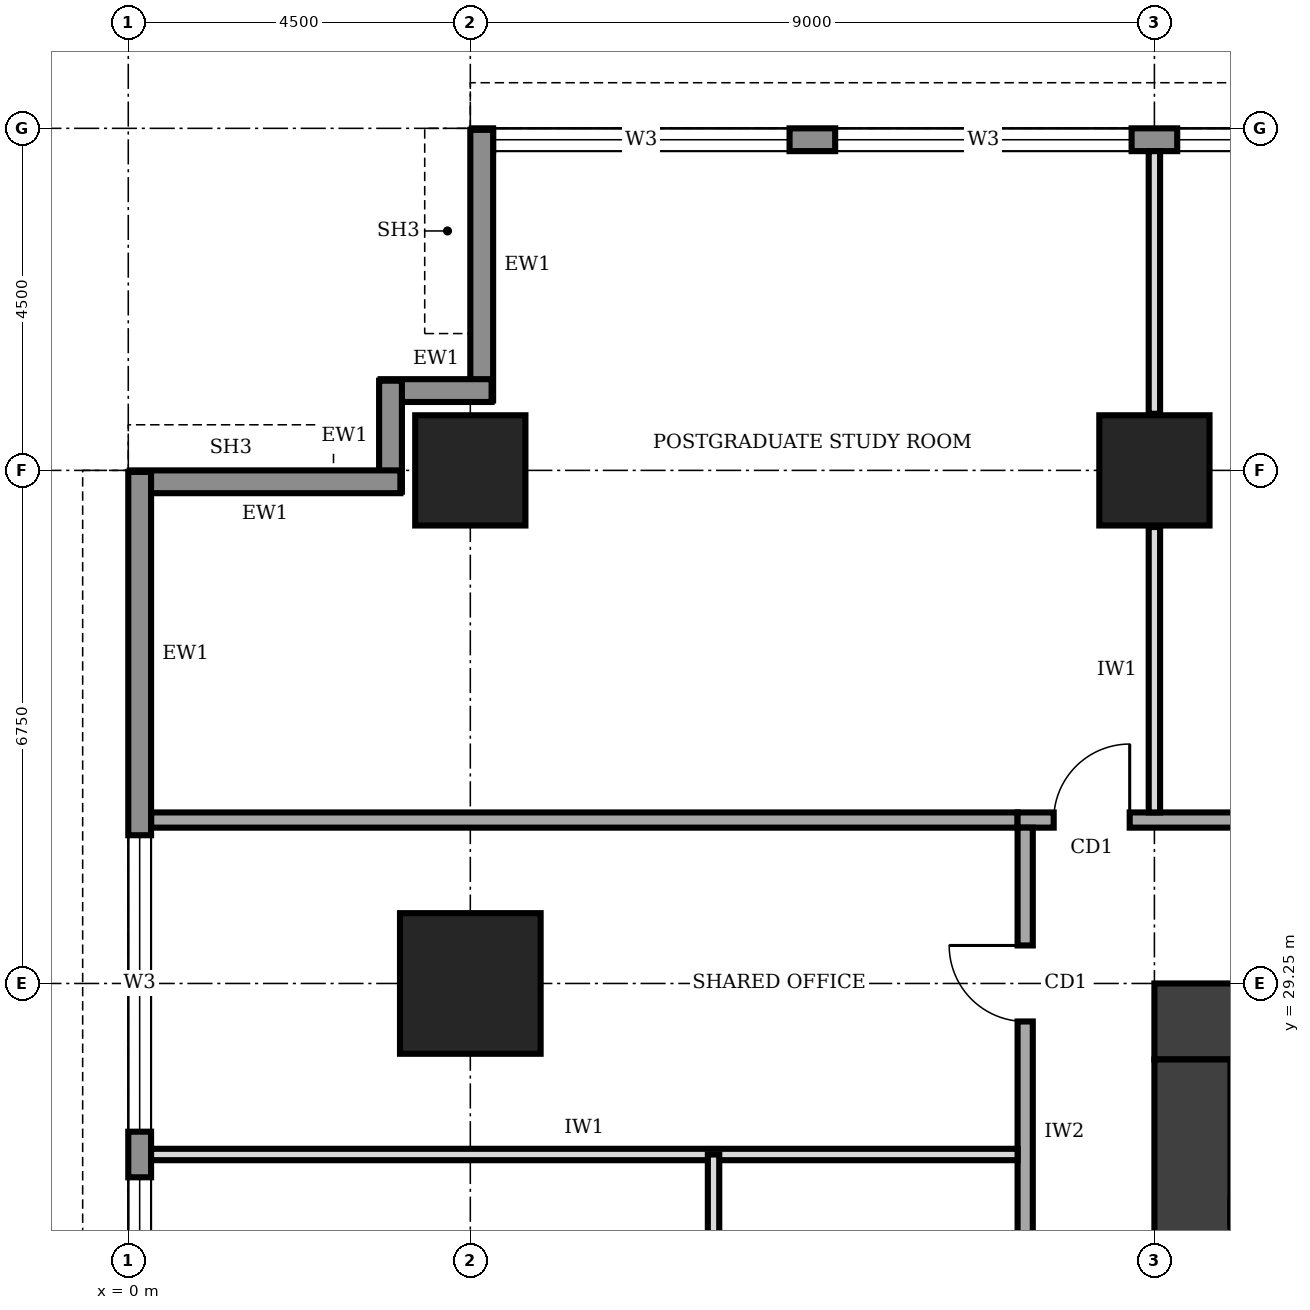
"""IFC4 building model, lengths in metres.
Left out: names, types, materials, properties, quantities, classifications, styles, units other than length and angle.
Written with IfcOpenShell. Run it as: python <this file> out.ifc"""

import sys

from ifc_helpers import new_model, si_unit, direction, frame, frame_2d, origin, origin_2d, place, context, subcontext, project, spatial, rectangle, extrude, element, fill, save


model = new_model("IFC4")
c1 = context("Model", 3, precision=1e-05, world=origin(), true_north=direction((0.0, 1.0)))
c2 = subcontext(c1, "Body", "Model", "MODEL_VIEW")
j1 = project(units=[si_unit("LENGTHUNIT", "METRE"), si_unit("PLANEANGLEUNIT", "RADIAN")], contexts=[c1])
p1 = place(None, origin())
s1 = spatial("IfcSite", under=j1, at=p1, CompositionType="ELEMENT")
p2 = place(p1, origin())
s2 = spatial("IfcBuilding", under=s1, at=p2, CompositionType="ELEMENT")
p3 = place(p2, frame((0.0, 0.0, 261.0)))
s3 = spatial("IfcBuildingStorey", under=s2, at=p3, CompositionType="ELEMENT", Elevation=261.0)
p4 = place(p3, frame((27.0, 28.75, 0.0), z_axis=(0.0, 0.0, 1.0), x_axis=(-1.0, 0.0, 0.0)))
e1 = element("IfcWall", 1, at=p4, inside=s3, PredefinedType="SHEAR", context=c2, shape_type="SweptSolid", body=[
    extrude(rectangle(XDim=13.5, YDim=1.0, at=frame_2d((6.75, 0.0))), origin(), (0.0, 0.0, 1.0), 4.0),
])
p5 = place(p4, frame((4.75, 0.0, 0.0)))
e2 = element("IfcOpeningElement", 2, at=p5, cuts=e1, PredefinedType="OPENING", context=c2, shape_type="SweptSolid", body=[
    extrude(rectangle(XDim=1.8, YDim=2.1, at=frame_2d((0.9, 1.05))), frame((0.0, 0.51, 0.0), z_axis=(0.0, -1.0, 0.0), x_axis=(1.0, 0.0, 0.0)), (0.0, 0.0, 1.0), 1.02),
])
p6 = place(p3, frame((14.0, 28.25, 0.0), z_axis=(0.0, 0.0, 1.0), x_axis=(0.0, -1.0, 0.0)))
e3 = element("IfcWall", 3, at=p6, inside=s3, PredefinedType="SHEAR", context=c2, shape_type="SweptSolid", body=[
    extrude(rectangle(XDim=16.0, YDim=1.0, at=frame_2d((8.0, 0.0))), origin(), (0.0, 0.0, 1.0), 4.0),
])
p7 = place(p3, frame((4.5, 29.25, 0.0), z_axis=(0.0, 0.0, 1.0), x_axis=(1.0, 0.0, 0.0)))
e4 = element("IfcColumn", 4, at=p7, inside=s3, PredefinedType="COLUMN", context=c2, shape_type="SweptSolid", body=[
    extrude(rectangle(XDim=1.85, YDim=1.85, at=origin_2d()), origin(), (0.0, 0.0, 1.0), 4.0),
])
for number, where, z_axis, x_axis in (
    (5, (4.5, 36.0, 0.0), (0.0, 0.0, 1.0), (1.0, 0.0, 0.0)),
    (6, (13.5, 36.0, 0.0), (0.0, 0.0, 1.0), (1.0, 0.0, 0.0)),
):
    element("IfcColumn", number, at=place(p3, frame(where, z_axis=z_axis, x_axis=x_axis)), inside=s3, PredefinedType="COLUMN", context=c2, shape_type="SweptSolid", body=[
        extrude(rectangle(XDim=1.45, YDim=1.45, at=origin_2d()), origin(), (0.0, 0.0, 1.0), 4.0),
    ])
p8 = place(p3, frame((35.98, 40.35, 0.0), z_axis=(0.0, 0.0, 1.0), x_axis=(-1.0, 0.0, 0.0)))
e7 = element("IfcWall", 7, at=p8, inside=s3, PredefinedType="STANDARD", context=c2, shape_type="SweptSolid", body=[
    extrude(rectangle(XDim=31.46, YDim=0.3, at=frame_2d((15.73, 0.0))), origin(), (0.0, 0.0, 1.0), 3.75),
])
p9 = place(p8, frame((27.28, 0.0, 0.95)))
e8 = element("IfcOpeningElement", 8, at=p9, cuts=e7, PredefinedType="OPENING", context=c2, shape_type="SweptSolid", body=[
    extrude(rectangle(XDim=3.9, YDim=1.8, at=frame_2d((1.95, 0.9))), frame((0.0, 0.16, 0.0), z_axis=(0.0, -1.0, 0.0), x_axis=(1.0, 0.0, 0.0)), (0.0, 0.0, 1.0), 0.32),
])
p10 = place(p8, frame((22.78, 0.0, 0.95)))
e9 = element("IfcOpeningElement", 9, at=p10, cuts=e7, PredefinedType="OPENING", context=c2, shape_type="SweptSolid", body=[
    extrude(rectangle(XDim=3.9, YDim=1.8, at=frame_2d((1.95, 0.9))), frame((0.0, 0.16, 0.0), z_axis=(0.0, -1.0, 0.0), x_axis=(1.0, 0.0, 0.0)), (0.0, 0.0, 1.0), 0.32),
])
p11 = place(p8, frame((18.28, 0.0, 0.95)))
e10 = element("IfcOpeningElement", 10, at=p11, cuts=e7, PredefinedType="OPENING", context=c2, shape_type="SweptSolid", body=[
    extrude(rectangle(XDim=3.9, YDim=1.8, at=frame_2d((1.95, 0.9))), frame((0.0, 0.16, 0.0), z_axis=(0.0, -1.0, 0.0), x_axis=(1.0, 0.0, 0.0)), (0.0, 0.0, 1.0), 0.32),
])
p12 = place(p8, frame((13.78, 0.0, 0.95)))
e11 = element("IfcOpeningElement", 11, at=p12, cuts=e7, PredefinedType="OPENING", context=c2, shape_type="SweptSolid", body=[
    extrude(rectangle(XDim=3.9, YDim=1.8, at=frame_2d((1.95, 0.9))), frame((0.0, 0.16, 0.0), z_axis=(0.0, -1.0, 0.0), x_axis=(1.0, 0.0, 0.0)), (0.0, 0.0, 1.0), 0.32),
])
p13 = place(p8, frame((9.28, 0.0, 0.95)))
e12 = element("IfcOpeningElement", 12, at=p13, cuts=e7, PredefinedType="OPENING", context=c2, shape_type="SweptSolid", body=[
    extrude(rectangle(XDim=3.9, YDim=1.8, at=frame_2d((1.95, 0.9))), frame((0.0, 0.16, 0.0), z_axis=(0.0, -1.0, 0.0), x_axis=(1.0, 0.0, 0.0)), (0.0, 0.0, 1.0), 0.32),
])
p14 = place(p8, frame((4.78, 0.0, 0.95)))
e13 = element("IfcOpeningElement", 13, at=p14, cuts=e7, PredefinedType="OPENING", context=c2, shape_type="SweptSolid", body=[
    extrude(rectangle(XDim=3.9, YDim=1.8, at=frame_2d((1.95, 0.9))), frame((0.0, 0.16, 0.0), z_axis=(0.0, -1.0, 0.0), x_axis=(1.0, 0.0, 0.0)), (0.0, 0.0, 1.0), 0.32),
])
p15 = place(p3, frame((4.65, 40.48, 0.0), z_axis=(0.0, 0.0, 1.0), x_axis=(0.0, -1.0, 0.0)))
e14 = element("IfcWall", 14, at=p15, inside=s3, PredefinedType="STANDARD", context=c2, shape_type="SweptSolid", body=[
    extrude(rectangle(XDim=3.56, YDim=0.3, at=frame_2d((1.78, 0.0))), origin(), (0.0, 0.0, 1.0), 2.85),
])
for number, where, z_axis, x_axis in (
    (15, (4.78, 37.05, 0.0), (0.0, 0.0, 1.0), (-1.0, 0.0, 0.0)),
    (16, (3.45, 37.18, 0.0), (0.0, 0.0, 1.0), (0.0, -1.0, 0.0)),
):
    element("IfcWall", number, at=place(p3, frame(where, z_axis=z_axis, x_axis=x_axis)), inside=s3, PredefinedType="STANDARD", context=c2, shape_type="SweptSolid", body=[
        extrude(rectangle(XDim=1.46, YDim=0.3, at=frame_2d((0.73, 0.0))), origin(), (0.0, 0.0, 1.0), 3.75),
    ])
p16 = place(p3, frame((3.58, 35.85, 0.0), z_axis=(0.0, 0.0, 1.0), x_axis=(-1.0, 0.0, 0.0)))
e17 = element("IfcWall", 17, at=p16, inside=s3, PredefinedType="STANDARD", context=c2, shape_type="SweptSolid", body=[
    extrude(rectangle(XDim=3.56, YDim=0.3, at=frame_2d((1.78, 0.0))), origin(), (0.0, 0.0, 1.0), 2.85),
])
p17 = place(p3, frame((0.15, 35.98, 0.0), z_axis=(0.0, 0.0, 1.0), x_axis=(0.0, -1.0, 0.0)))
e18 = element("IfcWall", 18, at=p17, inside=s3, PredefinedType="STANDARD", context=c2, shape_type="SweptSolid", body=[
    extrude(rectangle(XDim=31.46, YDim=0.3, at=frame_2d((15.73, 0.0))), origin(), (0.0, 0.0, 1.0), 3.75),
])
p18 = place(p17, frame((27.28, 0.0, 0.95)))
e19 = element("IfcOpeningElement", 19, at=p18, cuts=e18, PredefinedType="OPENING", context=c2, shape_type="SweptSolid", body=[
    extrude(rectangle(XDim=3.9, YDim=1.8, at=frame_2d((1.95, 0.9))), frame((0.0, 0.16, 0.0), z_axis=(0.0, -1.0, 0.0), x_axis=(1.0, 0.0, 0.0)), (0.0, 0.0, 1.0), 0.32),
])
p19 = place(p17, frame((22.78, 0.0, 0.95)))
e20 = element("IfcOpeningElement", 20, at=p19, cuts=e18, PredefinedType="OPENING", context=c2, shape_type="SweptSolid", body=[
    extrude(rectangle(XDim=3.9, YDim=1.8, at=frame_2d((1.95, 0.9))), frame((0.0, 0.16, 0.0), z_axis=(0.0, -1.0, 0.0), x_axis=(1.0, 0.0, 0.0)), (0.0, 0.0, 1.0), 0.32),
])
p20 = place(p17, frame((18.28, 0.0, 0.95)))
e21 = element("IfcOpeningElement", 21, at=p20, cuts=e18, PredefinedType="OPENING", context=c2, shape_type="SweptSolid", body=[
    extrude(rectangle(XDim=3.9, YDim=1.8, at=frame_2d((1.95, 0.9))), frame((0.0, 0.16, 0.0), z_axis=(0.0, -1.0, 0.0), x_axis=(1.0, 0.0, 0.0)), (0.0, 0.0, 1.0), 0.32),
])
p21 = place(p17, frame((13.78, 0.0, 0.95)))
e22 = element("IfcOpeningElement", 22, at=p21, cuts=e18, PredefinedType="OPENING", context=c2, shape_type="SweptSolid", body=[
    extrude(rectangle(XDim=3.9, YDim=1.8, at=frame_2d((1.95, 0.9))), frame((0.0, 0.16, 0.0), z_axis=(0.0, -1.0, 0.0), x_axis=(1.0, 0.0, 0.0)), (0.0, 0.0, 1.0), 0.32),
])
p22 = place(p17, frame((9.28, 0.0, 0.95)))
e23 = element("IfcOpeningElement", 23, at=p22, cuts=e18, PredefinedType="OPENING", context=c2, shape_type="SweptSolid", body=[
    extrude(rectangle(XDim=3.9, YDim=1.8, at=frame_2d((1.95, 0.9))), frame((0.0, 0.16, 0.0), z_axis=(0.0, -1.0, 0.0), x_axis=(1.0, 0.0, 0.0)), (0.0, 0.0, 1.0), 0.32),
])
p23 = place(p17, frame((4.78, 0.0, 0.95)))
e24 = element("IfcOpeningElement", 24, at=p23, cuts=e18, PredefinedType="OPENING", context=c2, shape_type="SweptSolid", body=[
    extrude(rectangle(XDim=3.9, YDim=1.8, at=frame_2d((1.95, 0.9))), frame((0.0, 0.16, 0.0), z_axis=(0.0, -1.0, 0.0), x_axis=(1.0, 0.0, 0.0)), (0.0, 0.0, 1.0), 0.32),
])
p24 = place(p3, frame((28.6, 31.4, 0.0), z_axis=(0.0, 0.0, 1.0), x_axis=(-1.0, 0.0, 0.0)))
e25 = element("IfcWall", 25, at=p24, inside=s3, PredefinedType="SOLIDWALL", context=c2, shape_type="SweptSolid", body=[
    extrude(rectangle(XDim=16.9, YDim=0.2, at=frame_2d((8.45, 0.0))), origin(), (0.0, 0.0, 1.0), 3.75),
])
p25 = place(p24, frame((15.425, 0.0, 0.0)))
e26 = element("IfcOpeningElement", 26, at=p25, cuts=e25, PredefinedType="OPENING", context=c2, shape_type="SweptSolid", body=[
    extrude(rectangle(XDim=1.0, YDim=2.1, at=frame_2d((0.5, 1.05))), frame((0.0, 0.11, 0.0), z_axis=(0.0, -1.0, 0.0), x_axis=(1.0, 0.0, 0.0)), (0.0, 0.0, 1.0), 0.22),
])
p26 = place(p24, frame((10.1, 0.0, 0.0)))
e27 = element("IfcOpeningElement", 27, at=p26, cuts=e25, PredefinedType="OPENING", context=c2, shape_type="SweptSolid", body=[
    extrude(rectangle(XDim=1.0, YDim=2.1, at=frame_2d((0.5, 1.05))), frame((0.0, 0.11, 0.0), z_axis=(0.0, -1.0, 0.0), x_axis=(1.0, 0.0, 0.0)), (0.0, 0.0, 1.0), 0.22),
])
p27 = place(p24, frame((2.25, 0.0, 0.0)))
e28 = element("IfcOpeningElement", 28, at=p27, cuts=e25, PredefinedType="OPENING", context=c2, shape_type="SweptSolid", body=[
    extrude(rectangle(XDim=1.4, YDim=2.1, at=frame_2d((0.7, 1.05))), frame((0.0, 0.11, 0.0), z_axis=(0.0, -1.0, 0.0), x_axis=(1.0, 0.0, 0.0)), (0.0, 0.0, 1.0), 0.22),
])
p28 = place(p3, frame((11.8, 31.3, 0.0), z_axis=(0.0, 0.0, 1.0), x_axis=(0.0, -1.0, 0.0)))
e29 = element("IfcWall", 29, at=p28, inside=s3, PredefinedType="SOLIDWALL", context=c2, shape_type="SweptSolid", body=[
    extrude(rectangle(XDim=22.3, YDim=0.2, at=frame_2d((11.15, 0.0))), origin(), (0.0, 0.0, 1.0), 3.75),
])
p29 = place(p28, frame((19.55, 0.0, 0.0)))
e30 = element("IfcOpeningElement", 30, at=p29, cuts=e29, PredefinedType="OPENING", context=c2, shape_type="SweptSolid", body=[
    extrude(rectangle(XDim=1.0, YDim=2.1, at=frame_2d((0.5, 1.05))), frame((0.0, 0.11, 0.0), z_axis=(0.0, -1.0, 0.0), x_axis=(1.0, 0.0, 0.0)), (0.0, 0.0, 1.0), 0.22),
])
p30 = place(p28, frame((16.2, 0.0, 0.0)))
e31 = element("IfcOpeningElement", 31, at=p30, cuts=e29, PredefinedType="OPENING", context=c2, shape_type="SweptSolid", body=[
    extrude(rectangle(XDim=1.0, YDim=2.1, at=frame_2d((0.5, 1.05))), frame((0.0, 0.11, 0.0), z_axis=(0.0, -1.0, 0.0), x_axis=(1.0, 0.0, 0.0)), (0.0, 0.0, 1.0), 0.22),
])
p31 = place(p28, frame((13.2, 0.0, 0.0)))
e32 = element("IfcOpeningElement", 32, at=p31, cuts=e29, PredefinedType="OPENING", context=c2, shape_type="SweptSolid", body=[
    extrude(rectangle(XDim=0.9, YDim=2.1, at=frame_2d((0.45, 1.05))), frame((0.0, 0.11, 0.0), z_axis=(0.0, -1.0, 0.0), x_axis=(1.0, 0.0, 0.0)), (0.0, 0.0, 1.0), 0.22),
])
p32 = place(p28, frame((10.15, 0.0, 0.0)))
e33 = element("IfcOpeningElement", 33, at=p32, cuts=e29, PredefinedType="OPENING", context=c2, shape_type="SweptSolid", body=[
    extrude(rectangle(XDim=0.9, YDim=2.1, at=frame_2d((0.45, 1.05))), frame((0.0, 0.11, 0.0), z_axis=(0.0, -1.0, 0.0), x_axis=(1.0, 0.0, 0.0)), (0.0, 0.0, 1.0), 0.22),
])
p33 = place(p28, frame((5.45, 0.0, 0.0)))
e34 = element("IfcOpeningElement", 34, at=p33, cuts=e29, PredefinedType="OPENING", context=c2, shape_type="SweptSolid", body=[
    extrude(rectangle(XDim=0.9, YDim=2.1, at=frame_2d((0.45, 1.05))), frame((0.0, 0.11, 0.0), z_axis=(0.0, -1.0, 0.0), x_axis=(1.0, 0.0, 0.0)), (0.0, 0.0, 1.0), 0.22),
])
p34 = place(p28, frame((8.0, 0.0, 0.0)))
e35 = element("IfcOpeningElement", 35, at=p34, cuts=e29, PredefinedType="OPENING", context=c2, shape_type="SweptSolid", body=[
    extrude(rectangle(XDim=1.0, YDim=2.1, at=frame_2d((0.5, 1.05))), frame((0.0, 0.11, 0.0), z_axis=(0.0, -1.0, 0.0), x_axis=(1.0, 0.0, 0.0)), (0.0, 0.0, 1.0), 0.22),
])
p35 = place(p28, frame((1.55, 0.0, 0.0)))
e36 = element("IfcOpeningElement", 36, at=p35, cuts=e29, PredefinedType="OPENING", context=c2, shape_type="SweptSolid", body=[
    extrude(rectangle(XDim=1.0, YDim=2.1, at=frame_2d((0.5, 1.05))), frame((0.0, 0.11, 0.0), z_axis=(0.0, -1.0, 0.0), x_axis=(1.0, 0.0, 0.0)), (0.0, 0.0, 1.0), 0.22),
])
p36 = place(p3, frame((0.3, 31.4, 0.0), z_axis=(0.0, 0.0, 1.0), x_axis=(1.0, 0.0, 0.0)))
e37 = element("IfcWall", 37, at=p36, inside=s3, PredefinedType="SOLIDWALL", context=c2, shape_type="SweptSolid", body=[
    extrude(rectangle(XDim=11.4, YDim=0.2, at=frame_2d((5.7, 0.0))), origin(), (0.0, 0.0, 1.0), 3.75),
])
p37 = place(p3, frame((13.5, 31.5, 0.0), z_axis=(0.0, 0.0, 1.0), x_axis=(0.0, 1.0, 0.0)))
e38 = element("IfcWall", 38, at=p37, inside=s3, PredefinedType="PARTITIONING", context=c2, shape_type="SweptSolid", body=[
    extrude(rectangle(XDim=3.755, YDim=0.15, at=frame_2d((1.877, 0.0))), origin(), (0.0, 0.0, 1.0), 2.85),
])
p38 = place(p3, frame((13.5, 36.745, 0.0), z_axis=(0.0, 0.0, 1.0), x_axis=(0.0, 1.0, 0.0)))
e39 = element("IfcWall", 39, at=p38, inside=s3, PredefinedType="PARTITIONING", context=c2, shape_type="SweptSolid", body=[
    extrude(rectangle(XDim=3.455, YDim=0.15, at=frame_2d((1.728, 0.0))), origin(), (0.0, 0.0, 1.0), 2.85),
])
p39 = place(p3, frame((0.3, 27.0, 0.0), z_axis=(0.0, 0.0, 1.0), x_axis=(1.0, 0.0, 0.0)))
e40 = element("IfcWall", 40, at=p39, inside=s3, PredefinedType="PARTITIONING", context=c2, shape_type="SweptSolid", body=[
    extrude(rectangle(XDim=11.4, YDim=0.15, at=frame_2d((5.7, 0.0))), origin(), (0.0, 0.0, 1.0), 3.75),
])
p40 = place(p3, frame((7.7, 23.8, 0.0), z_axis=(0.0, 0.0, 1.0), x_axis=(0.0, 1.0, 0.0)))
e41 = element("IfcWall", 41, at=p40, inside=s3, PredefinedType="PARTITIONING", context=c2, shape_type="SweptSolid", body=[
    extrude(rectangle(XDim=3.2, YDim=0.15, at=frame_2d((1.6, 0.0))), origin(), (0.0, 0.0, 1.0), 3.75),
])
p41 = place(p9, origin())
e42 = element("IfcWindow", 42, at=p41, inside=s3, PartitioningType="SINGLE_PANEL", PredefinedType="WINDOW", context=c2, shape_type="SweptSolid", body=[
    extrude(rectangle(XDim=3.9, YDim=1.8, at=frame_2d((1.95, 0.9))), frame((0.0, 0.03, 0.0), z_axis=(0.0, -1.0, 0.0), x_axis=(1.0, 0.0, 0.0)), (0.0, 0.0, 1.0), 0.06),
])
fill(e8, e42)
p42 = place(p10, origin())
e43 = element("IfcWindow", 43, at=p42, inside=s3, PartitioningType="SINGLE_PANEL", PredefinedType="WINDOW", context=c2, shape_type="SweptSolid", body=[
    extrude(rectangle(XDim=3.9, YDim=1.8, at=frame_2d((1.95, 0.9))), frame((0.0, 0.03, 0.0), z_axis=(0.0, -1.0, 0.0), x_axis=(1.0, 0.0, 0.0)), (0.0, 0.0, 1.0), 0.06),
])
fill(e9, e43)
p43 = place(p11, origin())
e44 = element("IfcWindow", 44, at=p43, inside=s3, PartitioningType="SINGLE_PANEL", PredefinedType="WINDOW", context=c2, shape_type="SweptSolid", body=[
    extrude(rectangle(XDim=3.9, YDim=1.8, at=frame_2d((1.95, 0.9))), frame((0.0, 0.03, 0.0), z_axis=(0.0, -1.0, 0.0), x_axis=(1.0, 0.0, 0.0)), (0.0, 0.0, 1.0), 0.06),
])
fill(e10, e44)
p44 = place(p22, origin())
e45 = element("IfcWindow", 45, at=p44, inside=s3, PartitioningType="SINGLE_PANEL", PredefinedType="WINDOW", context=c2, shape_type="SweptSolid", body=[
    extrude(rectangle(XDim=3.9, YDim=1.8, at=frame_2d((1.95, 0.9))), frame((0.0, 0.03, 0.0), z_axis=(0.0, -1.0, 0.0), x_axis=(1.0, 0.0, 0.0)), (0.0, 0.0, 1.0), 0.06),
])
fill(e23, e45)
p45 = place(p23, origin())
e46 = element("IfcWindow", 46, at=p45, inside=s3, PartitioningType="SINGLE_PANEL", PredefinedType="WINDOW", context=c2, shape_type="SweptSolid", body=[
    extrude(rectangle(XDim=3.9, YDim=1.8, at=frame_2d((1.95, 0.9))), frame((0.0, 0.03, 0.0), z_axis=(0.0, -1.0, 0.0), x_axis=(1.0, 0.0, 0.0)), (0.0, 0.0, 1.0), 0.06),
])
fill(e24, e46)
p46 = place(p25, frame((1.0, 0.0, 0.0), z_axis=(0.0, 0.0, 1.0), x_axis=(-1.0, 0.0, 0.0)))
e47 = element("IfcDoor", 47, at=p46, inside=s3, OperationType="SINGLE_SWING_RIGHT", PredefinedType="DOOR", context=c2, shape_type="SweptSolid", body=[
    extrude(rectangle(XDim=1.0, YDim=2.1, at=frame_2d((0.5, 1.05))), frame((0.0, 0.025, 0.0), z_axis=(0.0, -1.0, 0.0), x_axis=(1.0, 0.0, 0.0)), (0.0, 0.0, 1.0), 0.05),
])
fill(e26, e47)
p47 = place(p35, frame((1.0, 0.0, 0.0), z_axis=(0.0, 0.0, 1.0), x_axis=(-1.0, 0.0, 0.0)))
e48 = element("IfcDoor", 48, at=p47, inside=s3, OperationType="SINGLE_SWING_RIGHT", PredefinedType="DOOR", context=c2, shape_type="SweptSolid", body=[
    extrude(rectangle(XDim=1.0, YDim=2.1, at=frame_2d((0.5, 1.05))), frame((0.0, 0.025, 0.0), z_axis=(0.0, -1.0, 0.0), x_axis=(1.0, 0.0, 0.0)), (0.0, 0.0, 1.0), 0.05),
])
fill(e36, e48)
save(model, sys.argv[1])
